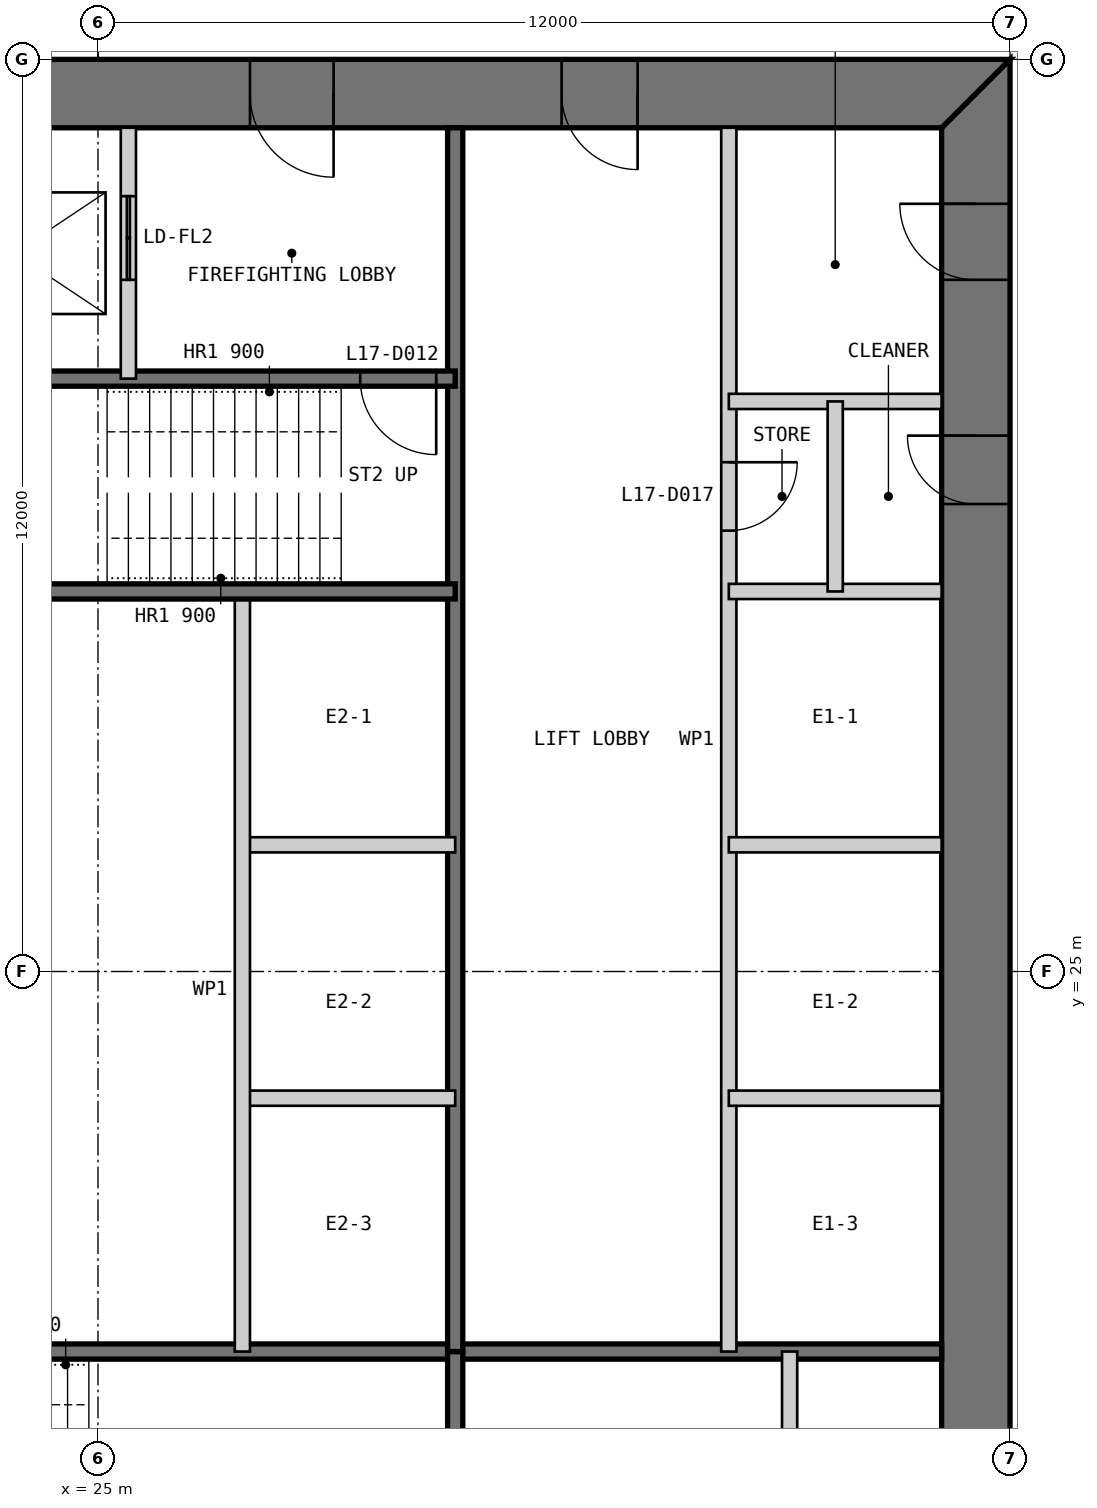
"""IFC4 building model, lengths in metres.
Left out: names, types, materials, properties, quantities, classifications, styles, units other than length and angle.
Written with IfcOpenShell. Run it as: python <this file> out.ifc"""

import sys

from ifc_helpers import new_model, si_unit, direction, frame, frame_2d, origin, place, context, subcontext, project, spatial, polyline, rectangle, outline, extrude, element, fill, save


model = new_model("IFC4")
c1 = context("Model", 3, precision=1e-05, world=origin(), true_north=direction((0.0, 1.0)))
c2 = subcontext(c1, "Body", "Model", "MODEL_VIEW")
j1 = project(units=[si_unit("LENGTHUNIT", "METRE"), si_unit("PLANEANGLEUNIT", "RADIAN")], contexts=[c1])
p1 = place(None, origin())
s1 = spatial("IfcSite", under=j1, at=p1, CompositionType="ELEMENT")
p2 = place(p1, origin())
s2 = spatial("IfcBuilding", under=s1, at=p2, CompositionType="ELEMENT")
p3 = place(p2, frame((0.0, 0.0, 75.0)))
s3 = spatial("IfcBuildingStorey", under=s2, at=p3, CompositionType="ELEMENT", Elevation=75.0)
p4 = place(p3, frame((36.55, 13.9, 0.0), z_axis=(0.0, 0.0, 1.0), x_axis=(0.0, 1.0, 0.0)))
e1 = element("IfcWall", 1, at=p4, inside=s3, PredefinedType="SHEAR", context=c2, shape_type="SweptSolid", body=[
    extrude(outline(polyline([(-0.9, -0.45), (23.1, -0.45), (22.2, 0.45), (0.0, 0.45), (-0.9, -0.45)])), origin(), (0.0, 0.0, 1.0), 4.0),
])
p5 = place(p4, frame((20.2, 0.0, 0.0)))
e2 = element("IfcOpeningElement", 2, at=p5, cuts=e1, PredefinedType="OPENING", context=c2, shape_type="SweptSolid", body=[
    extrude(rectangle(XDim=1.0, YDim=2.2, at=frame_2d((0.5, 1.1))), frame((0.0, 0.46, 0.0), z_axis=(0.0, -1.0, 0.0), x_axis=(1.0, 0.0, 0.0)), (0.0, 0.0, 1.0), 0.92),
])
p6 = place(p4, frame((17.25, 0.0, 0.0)))
e3 = element("IfcOpeningElement", 3, at=p6, cuts=e1, PredefinedType="OPENING", context=c2, shape_type="SweptSolid", body=[
    extrude(rectangle(XDim=0.9, YDim=2.2, at=frame_2d((0.45, 1.1))), frame((0.0, 0.46, 0.0), z_axis=(0.0, -1.0, 0.0), x_axis=(1.0, 0.0, 0.0)), (0.0, 0.0, 1.0), 0.92),
])
p7 = place(p3, frame((37.0, 36.55, 0.0), z_axis=(0.0, 0.0, 1.0), x_axis=(-1.0, 0.0, 0.0)))
e4 = element("IfcWall", 4, at=p7, inside=s3, PredefinedType="SHEAR", context=c2, shape_type="SweptSolid", body=[
    extrude(outline(polyline([(0.0, -0.45), (24.0, -0.45), (23.1, 0.45), (0.9, 0.45), (0.0, -0.45)])), origin(), (0.0, 0.0, 1.0), 4.0),
])
p8 = place(p7, frame((4.9, 0.0, 0.0)))
e5 = element("IfcOpeningElement", 5, at=p8, cuts=e4, PredefinedType="OPENING", context=c2, shape_type="SweptSolid", body=[
    extrude(rectangle(XDim=1.0, YDim=2.2, at=frame_2d((0.5, 1.1))), frame((0.0, 0.46, 0.0), z_axis=(0.0, -1.0, 0.0), x_axis=(1.0, 0.0, 0.0)), (0.0, 0.0, 1.0), 0.92),
])
p9 = place(p7, frame((8.9, 0.0, 0.0)))
e6 = element("IfcOpeningElement", 6, at=p9, cuts=e4, PredefinedType="OPENING", context=c2, shape_type="SweptSolid", body=[
    extrude(rectangle(XDim=1.1, YDim=2.2, at=frame_2d((0.55, 1.1))), frame((0.0, 0.46, 0.0), z_axis=(0.0, -1.0, 0.0), x_axis=(1.0, 0.0, 0.0)), (0.0, 0.0, 1.0), 0.92),
])
p10 = place(p7, frame((15.05, 0.0, 0.0)))
e7 = element("IfcOpeningElement", 7, at=p10, cuts=e4, PredefinedType="OPENING", context=c2, shape_type="SweptSolid", body=[
    extrude(rectangle(XDim=0.9, YDim=2.2, at=frame_2d((0.45, 1.1))), frame((0.0, 0.46, 0.0), z_axis=(0.0, -1.0, 0.0), x_axis=(1.0, 0.0, 0.0)), (0.0, 0.0, 1.0), 0.92),
])
p11 = place(p7, frame((17.9, 0.0, 0.0)))
e8 = element("IfcOpeningElement", 8, at=p11, cuts=e4, PredefinedType="OPENING", context=c2, shape_type="SweptSolid", body=[
    extrude(rectangle(XDim=1.0, YDim=2.2, at=frame_2d((0.5, 1.1))), frame((0.0, 0.46, 0.0), z_axis=(0.0, -1.0, 0.0), x_axis=(1.0, 0.0, 0.0)), (0.0, 0.0, 1.0), 0.92),
])
p12 = place(p7, frame((21.4, 0.0, 0.0)))
e9 = element("IfcOpeningElement", 9, at=p12, cuts=e4, PredefinedType="OPENING", context=c2, shape_type="SweptSolid", body=[
    extrude(rectangle(XDim=1.0, YDim=2.2, at=frame_2d((0.5, 1.1))), frame((0.0, 0.46, 0.0), z_axis=(0.0, -1.0, 0.0), x_axis=(1.0, 0.0, 0.0)), (0.0, 0.0, 1.0), 0.92),
])
p13 = place(p3, frame((20.3, 20.0, 0.0), z_axis=(0.0, 0.0, 1.0), x_axis=(1.0, 0.0, 0.0)))
e10 = element("IfcWall", 10, at=p13, inside=s3, PredefinedType="SOLIDWALL", context=c2, shape_type="SweptSolid", body=[
    extrude(rectangle(XDim=15.8, YDim=0.2, at=frame_2d((7.9, 0.0))), origin(), (0.0, 0.0, 1.0), 3.8),
])
p14 = place(p3, frame((29.7, 13.9, 0.0), z_axis=(0.0, 0.0, 1.0), x_axis=(0.0, 1.0, 0.0)))
e11 = element("IfcWall", 11, at=p14, inside=s3, PredefinedType="SOLIDWALL", context=c2, shape_type="SweptSolid", body=[
    extrude(rectangle(XDim=6.1, YDim=0.2, at=frame_2d((3.05, 0.0))), origin(), (0.0, 0.0, 1.0), 3.8),
])
p15 = place(p3, frame((34.1, 13.9, 0.0), z_axis=(0.0, 0.0, 1.0), x_axis=(0.0, 1.0, 0.0)))
e12 = element("IfcWall", 12, at=p15, inside=s3, PredefinedType="PARTITIONING", context=c2, shape_type="SweptSolid", body=[
    extrude(rectangle(XDim=6.1, YDim=0.2, at=frame_2d((3.05, 0.0))), origin(), (0.0, 0.0, 1.0), 3.8),
])
p16 = place(p3, frame((33.3, 36.1, 0.0), z_axis=(0.0, 0.0, 1.0), x_axis=(0.0, -1.0, 0.0)))
e13 = element("IfcWall", 13, at=p16, inside=s3, PredefinedType="PARTITIONING", context=c2, shape_type="SweptSolid", body=[
    extrude(rectangle(XDim=16.1, YDim=0.2, at=frame_2d((8.05, 0.0))), origin(), (0.0, 0.0, 1.0), 3.8),
])
p17 = place(p16, frame((4.4, 0.0, 0.0)))
e14 = element("IfcOpeningElement", 14, at=p17, cuts=e13, PredefinedType="OPENING", context=c2, shape_type="SweptSolid", body=[
    extrude(rectangle(XDim=0.9, YDim=2.2, at=frame_2d((0.45, 1.1))), frame((0.0, 0.11, 0.0), z_axis=(0.0, -1.0, 0.0), x_axis=(1.0, 0.0, 0.0)), (0.0, 0.0, 1.0), 0.22),
])
p18 = place(p3, frame((29.7, 36.1, 0.0), z_axis=(0.0, 0.0, 1.0), x_axis=(0.0, -1.0, 0.0)))
e15 = element("IfcWall", 15, at=p18, inside=s3, PredefinedType="SOLIDWALL", context=c2, shape_type="SweptSolid", body=[
    extrude(rectangle(XDim=16.1, YDim=0.2, at=frame_2d((8.05, 0.0))), origin(), (0.0, 0.0, 1.0), 3.8),
])
for number, where, z_axis, x_axis in (
    (16, (36.1, 30.0, 0.0), (0.0, 0.0, 1.0), (-1.0, 0.0, 0.0)),
    (17, (36.1, 26.667, 0.0), (0.0, 0.0, 1.0), (-1.0, 0.0, 0.0)),
    (18, (36.1, 23.333, 0.0), (0.0, 0.0, 1.0), (-1.0, 0.0, 0.0)),
    (19, (29.7, 26.667, 0.0), (0.0, 0.0, 1.0), (-1.0, 0.0, 0.0)),
    (20, (29.7, 23.333, 0.0), (0.0, 0.0, 1.0), (-1.0, 0.0, 0.0)),
):
    element("IfcWall", number, at=place(p3, frame(where, z_axis=z_axis, x_axis=x_axis)), inside=s3, PredefinedType="PARTITIONING", context=c2, shape_type="SweptSolid", body=[
        extrude(rectangle(XDim=2.8, YDim=0.2, at=frame_2d((1.4, 0.0))), origin(), (0.0, 0.0, 1.0), 3.8),
    ])
p19 = place(p3, frame((26.9, 30.0, 0.0), z_axis=(0.0, 0.0, 1.0), x_axis=(0.0, -1.0, 0.0)))
e21 = element("IfcWall", 21, at=p19, inside=s3, PredefinedType="PARTITIONING", context=c2, shape_type="SweptSolid", body=[
    extrude(rectangle(XDim=10.0, YDim=0.2, at=frame_2d((5.0, 0.0))), origin(), (0.0, 0.0, 1.0), 3.8),
])
p20 = place(p3, frame((29.7, 32.8, 0.0), z_axis=(0.0, 0.0, 1.0), x_axis=(-1.0, 0.0, 0.0)))
e22 = element("IfcWall", 22, at=p20, inside=s3, PredefinedType="SOLIDWALL", context=c2, shape_type="SweptSolid", body=[
    extrude(rectangle(XDim=9.4, YDim=0.2, at=frame_2d((4.7, 0.0))), origin(), (0.0, 0.0, 1.0), 3.8),
])
p21 = place(p20, frame((0.25, 0.0, 0.0)))
e23 = element("IfcOpeningElement", 23, at=p21, cuts=e22, PredefinedType="OPENING", context=c2, shape_type="SweptSolid", body=[
    extrude(rectangle(XDim=1.0, YDim=2.2, at=frame_2d((0.5, 1.1))), frame((0.0, 0.11, 0.0), z_axis=(0.0, -1.0, 0.0), x_axis=(1.0, 0.0, 0.0)), (0.0, 0.0, 1.0), 0.22),
])
p22 = place(p3, frame((29.7, 30.0, 0.0), z_axis=(0.0, 0.0, 1.0), x_axis=(-1.0, 0.0, 0.0)))
e24 = element("IfcWall", 24, at=p22, inside=s3, PredefinedType="SOLIDWALL", context=c2, shape_type="SweptSolid", body=[
    extrude(rectangle(XDim=15.8, YDim=0.2, at=frame_2d((7.9, 0.0))), origin(), (0.0, 0.0, 1.0), 3.8),
])
p23 = place(p3, frame((25.4, 36.1, 0.0), z_axis=(0.0, 0.0, 1.0), x_axis=(0.0, -1.0, 0.0)))
e25 = element("IfcWall", 25, at=p23, inside=s3, PredefinedType="PARTITIONING", context=c2, shape_type="SweptSolid", body=[
    extrude(rectangle(XDim=3.3, YDim=0.2, at=frame_2d((1.65, 0.0))), origin(), (0.0, 0.0, 1.0), 3.8),
])
p24 = place(p23, frame((0.9, 0.0, 0.0)))
e26 = element("IfcOpeningElement", 26, at=p24, cuts=e25, PredefinedType="OPENING", context=c2, shape_type="SweptSolid", body=[
    extrude(rectangle(XDim=1.1, YDim=2.2, at=frame_2d((0.55, 1.1))), frame((0.0, 0.11, 0.0), z_axis=(0.0, -1.0, 0.0), x_axis=(1.0, 0.0, 0.0)), (0.0, 0.0, 1.0), 0.22),
])
p25 = place(p3, frame((36.1, 32.5, 0.0), z_axis=(0.0, 0.0, 1.0), x_axis=(-1.0, 0.0, 0.0)))
e27 = element("IfcWall", 27, at=p25, inside=s3, PredefinedType="PARTITIONING", context=c2, shape_type="SweptSolid", body=[
    extrude(rectangle(XDim=2.8, YDim=0.2, at=frame_2d((1.4, 0.0))), origin(), (0.0, 0.0, 1.0), 3.8),
])
p26 = place(p3, frame((34.7, 32.5, 0.0), z_axis=(0.0, 0.0, 1.0), x_axis=(0.0, -1.0, 0.0)))
e28 = element("IfcWall", 28, at=p26, inside=s3, PredefinedType="PARTITIONING", context=c2, shape_type="SweptSolid", body=[
    extrude(rectangle(XDim=2.5, YDim=0.2, at=frame_2d((1.25, 0.0))), origin(), (0.0, 0.0, 1.0), 3.8),
])
p27 = place(p8, origin())
e29 = element("IfcDoor", 29, at=p27, inside=s3, OperationType="SINGLE_SWING_LEFT", PredefinedType="DOOR", context=c2, shape_type="SweptSolid", body=[
    extrude(rectangle(XDim=1.0, YDim=2.2, at=frame_2d((0.5, 1.1))), frame((0.0, 0.025, 0.0), z_axis=(0.0, -1.0, 0.0), x_axis=(1.0, 0.0, 0.0)), (0.0, 0.0, 1.0), 0.05),
    extrude(outline(polyline([(0.0, 0.0), (0.04, 0.0), (0.04, 2.16), (0.96, 2.16), (0.96, 0.0), (1.0, 0.0), (1.0, 2.2), (0.0, 2.2), (0.0, 0.0)])), frame((0.0, 0.3, 0.0), z_axis=(0.0, -1.0, 0.0), x_axis=(1.0, 0.0, 0.0)), (0.0, 0.0, 1.0), 0.6),
])
fill(e5, e29)
p28 = place(p9, origin())
e30 = element("IfcDoor", 30, at=p28, inside=s3, OperationType="SINGLE_SWING_LEFT", PredefinedType="DOOR", context=c2, shape_type="SweptSolid", body=[
    extrude(rectangle(XDim=1.1, YDim=2.2, at=frame_2d((0.55, 1.1))), frame((0.0, 0.025, 0.0), z_axis=(0.0, -1.0, 0.0), x_axis=(1.0, 0.0, 0.0)), (0.0, 0.0, 1.0), 0.05),
    extrude(outline(polyline([(0.0, 0.0), (0.04, 0.0), (0.04, 2.16), (1.06, 2.16), (1.06, 0.0), (1.1, 0.0), (1.1, 2.2), (0.0, 2.2), (0.0, 0.0)])), frame((0.0, 0.3, 0.0), z_axis=(0.0, -1.0, 0.0), x_axis=(1.0, 0.0, 0.0)), (0.0, 0.0, 1.0), 0.6),
])
fill(e6, e30)
p29 = place(p21, origin())
e31 = element("IfcDoor", 31, at=p29, inside=s3, OperationType="SINGLE_SWING_LEFT", PredefinedType="DOOR", context=c2, shape_type="SweptSolid", body=[
    extrude(rectangle(XDim=1.0, YDim=2.2, at=frame_2d((0.5, 1.1))), frame((0.0, 0.025, 0.0), z_axis=(0.0, -1.0, 0.0), x_axis=(1.0, 0.0, 0.0)), (0.0, 0.0, 1.0), 0.05),
])
fill(e23, e31)
p30 = place(p5, origin())
e32 = element("IfcDoor", 32, at=p30, inside=s3, OperationType="SINGLE_SWING_RIGHT", PredefinedType="DOOR", context=c2, shape_type="SweptSolid", body=[
    extrude(rectangle(XDim=1.0, YDim=2.2, at=frame_2d((0.5, 1.1))), frame((0.0, 0.025, 0.0), z_axis=(0.0, -1.0, 0.0), x_axis=(1.0, 0.0, 0.0)), (0.0, 0.0, 1.0), 0.05),
    extrude(outline(polyline([(0.0, 0.0), (0.04, 0.0), (0.04, 2.16), (0.96, 2.16), (0.96, 0.0), (1.0, 0.0), (1.0, 2.2), (0.0, 2.2), (0.0, 0.0)])), frame((0.0, 0.3, 0.0), z_axis=(0.0, -1.0, 0.0), x_axis=(1.0, 0.0, 0.0)), (0.0, 0.0, 1.0), 0.6),
])
fill(e2, e32)
p31 = place(p17, origin())
e33 = element("IfcDoor", 33, at=p31, inside=s3, OperationType="SINGLE_SWING_LEFT", PredefinedType="DOOR", context=c2, shape_type="SweptSolid", body=[
    extrude(rectangle(XDim=0.9, YDim=2.2, at=frame_2d((0.45, 1.1))), frame((0.0, 0.025, 0.0), z_axis=(0.0, -1.0, 0.0), x_axis=(1.0, 0.0, 0.0)), (0.0, 0.0, 1.0), 0.05),
])
fill(e14, e33)
p32 = place(p6, origin())
e34 = element("IfcDoor", 34, at=p32, inside=s3, OperationType="SINGLE_SWING_RIGHT", PredefinedType="DOOR", context=c2, shape_type="SweptSolid", body=[
    extrude(rectangle(XDim=0.9, YDim=2.2, at=frame_2d((0.45, 1.1))), frame((0.0, 0.025, 0.0), z_axis=(0.0, -1.0, 0.0), x_axis=(1.0, 0.0, 0.0)), (0.0, 0.0, 1.0), 0.05),
    extrude(outline(polyline([(0.0, 0.0), (0.04, 0.0), (0.04, 2.16), (0.86, 2.16), (0.86, 0.0), (0.9, 0.0), (0.9, 2.2), (0.0, 2.2), (0.0, 0.0)])), frame((0.0, 0.3, 0.0), z_axis=(0.0, -1.0, 0.0), x_axis=(1.0, 0.0, 0.0)), (0.0, 0.0, 1.0), 0.6),
])
fill(e3, e34)
p33 = place(p24, origin())
e35 = element("IfcDoor", 35, at=p33, inside=s3, OperationType="DOUBLE_DOOR_SLIDING", PredefinedType="DOOR", context=c2, shape_type="SweptSolid", body=[
    extrude(rectangle(XDim=1.1, YDim=2.2, at=frame_2d((0.55, 1.1))), frame((0.0, 0.025, 0.0), z_axis=(0.0, -1.0, 0.0), x_axis=(1.0, 0.0, 0.0)), (0.0, 0.0, 1.0), 0.05),
])
fill(e26, e35)
save(model, sys.argv[1])
